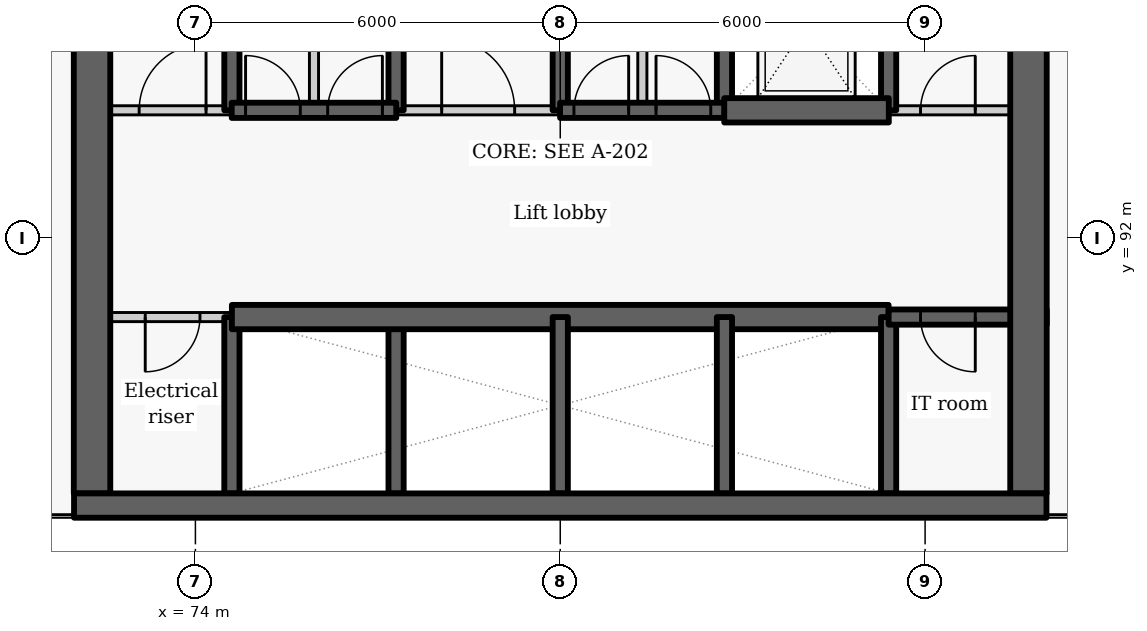
"""IFC4 building model, lengths in metres.
Left out: names, types, materials, properties, quantities, classifications, styles, units other than length and angle.
Written with IfcOpenShell. Run it as: python <this file> out.ifc"""

import sys

from ifc_helpers import new_model, si_unit, direction, frame, frame_2d, origin, place, context, subcontext, project, spatial, rectangle, extrude, element, fill, save


model = new_model("IFC4")
c1 = context("Model", 3, precision=1e-05, world=origin(), true_north=direction((0.0, 1.0)))
c2 = subcontext(c1, "Body", "Model", "MODEL_VIEW")
j1 = project(units=[si_unit("LENGTHUNIT", "METRE"), si_unit("PLANEANGLEUNIT", "RADIAN")], contexts=[c1])
p1 = place(None, origin())
s1 = spatial("IfcSite", under=j1, at=p1, CompositionType="ELEMENT")
p2 = place(p1, origin())
s2 = spatial("IfcBuilding", under=s1, at=p2, CompositionType="ELEMENT")
p3 = place(p2, frame((0.0, 0.0, 6.6)))
s3 = spatial("IfcBuildingStorey", under=s2, at=p3, CompositionType="ELEMENT", Elevation=6.6)
p4 = place(p3, frame((74.6, 87.8, -0.3), z_axis=(0.0, 0.0, 1.0), x_axis=(0.0, 1.0, 0.0)))
e1 = element("IfcWall", 1, at=p4, inside=s3, PredefinedType="SHEAR", context=c2, shape_type="SweptSolid", body=[
    extrude(rectangle(XDim=2.9, YDim=0.25, at=frame_2d((1.45, 0.0))), origin(), (0.0, 0.0, 1.0), 4.8),
])
p5 = place(p3, frame((74.6, 94.1, -0.3), z_axis=(0.0, 0.0, 1.0), x_axis=(0.0, 1.0, 0.0)))
e2 = element("IfcWall", 2, at=p5, inside=s3, PredefinedType="SHEAR", context=c2, shape_type="SweptSolid", body=[
    extrude(rectangle(XDim=2.8, YDim=0.25, at=frame_2d((1.4, 0.0))), origin(), (0.0, 0.0, 1.0), 4.8),
])
p6 = place(p3, frame((74.6, 90.7, 0.0), z_axis=(0.0, 0.0, 1.0), x_axis=(-1.0, 0.0, 0.0)))
e3 = element("IfcWall", 3, at=p6, inside=s3, PredefinedType="PARTITIONING", context=c2, shape_type="SweptSolid", body=[
    extrude(rectangle(XDim=2.6, YDim=0.15, at=frame_2d((1.3, 0.0))), origin(), (0.0, 0.0, 1.0), 4.5),
])
p7 = place(p6, frame((0.525, 0.0, 0.0)))
e4 = element("IfcOpeningElement", 4, at=p7, cuts=e3, PredefinedType="OPENING", context=c2, shape_type="SweptSolid", body=[
    extrude(rectangle(XDim=0.9, YDim=2.1, at=frame_2d((0.45, 1.05))), frame((0.0, 0.085, 0.0), z_axis=(0.0, -1.0, 0.0), x_axis=(1.0, 0.0, 0.0)), (0.0, 0.0, 1.0), 0.17),
])
p8 = place(p3, frame((72.3, 87.8, -0.3), z_axis=(0.0, 0.0, 1.0), x_axis=(0.0, 1.0, 0.0)))
e5 = element("IfcWall", 5, at=p8, inside=s3, PredefinedType="SHEAR", context=c2, shape_type="SweptSolid", body=[
    extrude(rectangle(XDim=9.1, YDim=0.6, at=frame_2d((4.55, 0.0))), origin(), (0.0, 0.0, 1.0), 4.8),
])
p9 = place(p3, frame((77.3, 87.8, -0.3), z_axis=(0.0, 0.0, 1.0), x_axis=(0.0, 1.0, 0.0)))
e6 = element("IfcWall", 6, at=p9, inside=s3, PredefinedType="SHEAR", context=c2, shape_type="SweptSolid", body=[
    extrude(rectangle(XDim=2.9, YDim=0.25, at=frame_2d((1.45, 0.0))), origin(), (0.0, 0.0, 1.0), 4.8),
])
p10 = place(p3, frame((77.3, 94.1, -0.3), z_axis=(0.0, 0.0, 1.0), x_axis=(0.0, 1.0, 0.0)))
e7 = element("IfcWall", 7, at=p10, inside=s3, PredefinedType="SHEAR", context=c2, shape_type="SweptSolid", body=[
    extrude(rectangle(XDim=2.8, YDim=0.25, at=frame_2d((1.4, 0.0))), origin(), (0.0, 0.0, 1.0), 4.8),
])
p11 = place(p3, frame((74.6, 90.7, -0.3), z_axis=(0.0, 0.0, 1.0), x_axis=(1.0, 0.0, 0.0)))
e8 = element("IfcWall", 8, at=p11, inside=s3, PredefinedType="SHEAR", context=c2, shape_type="SweptSolid", body=[
    extrude(rectangle(XDim=10.8, YDim=0.4, at=frame_2d((5.4, 0.0))), origin(), (0.0, 0.0, 1.0), 4.8),
])
p12 = place(p3, frame((80.0, 87.8, -0.3), z_axis=(0.0, 0.0, 1.0), x_axis=(0.0, 1.0, 0.0)))
e9 = element("IfcWall", 9, at=p12, inside=s3, PredefinedType="SHEAR", context=c2, shape_type="SweptSolid", body=[
    extrude(rectangle(XDim=2.9, YDim=0.25, at=frame_2d((1.45, 0.0))), origin(), (0.0, 0.0, 1.0), 4.8),
])
p13 = place(p3, frame((80.0, 94.1, -0.3), z_axis=(0.0, 0.0, 1.0), x_axis=(0.0, 1.0, 0.0)))
e10 = element("IfcWall", 10, at=p13, inside=s3, PredefinedType="SHEAR", context=c2, shape_type="SweptSolid", body=[
    extrude(rectangle(XDim=2.8, YDim=0.25, at=frame_2d((1.4, 0.0))), origin(), (0.0, 0.0, 1.0), 4.8),
])
p14 = place(p3, frame((82.7, 87.8, -0.3), z_axis=(0.0, 0.0, 1.0), x_axis=(0.0, 1.0, 0.0)))
e11 = element("IfcWall", 11, at=p14, inside=s3, PredefinedType="SHEAR", context=c2, shape_type="SweptSolid", body=[
    extrude(rectangle(XDim=2.9, YDim=0.25, at=frame_2d((1.45, 0.0))), origin(), (0.0, 0.0, 1.0), 4.8),
])
p15 = place(p3, frame((82.7, 94.1, -0.3), z_axis=(0.0, 0.0, 1.0), x_axis=(0.0, 1.0, 0.0)))
e12 = element("IfcWall", 12, at=p15, inside=s3, PredefinedType="SHEAR", context=c2, shape_type="SweptSolid", body=[
    extrude(rectangle(XDim=2.8, YDim=0.25, at=frame_2d((1.4, 0.0))), origin(), (0.0, 0.0, 1.0), 4.8),
])
p16 = place(p3, frame((85.4, 87.8, -0.3), z_axis=(0.0, 0.0, 1.0), x_axis=(0.0, 1.0, 0.0)))
e13 = element("IfcWall", 13, at=p16, inside=s3, PredefinedType="SHEAR", context=c2, shape_type="SweptSolid", body=[
    extrude(rectangle(XDim=2.9, YDim=0.25, at=frame_2d((1.45, 0.0))), origin(), (0.0, 0.0, 1.0), 4.8),
])
p17 = place(p3, frame((85.4, 94.1, -0.3), z_axis=(0.0, 0.0, 1.0), x_axis=(0.0, 1.0, 0.0)))
e14 = element("IfcWall", 14, at=p17, inside=s3, PredefinedType="SHEAR", context=c2, shape_type="SweptSolid", body=[
    extrude(rectangle(XDim=2.8, YDim=0.25, at=frame_2d((1.4, 0.0))), origin(), (0.0, 0.0, 1.0), 4.8),
])
p18 = place(p3, frame((88.0, 90.7, -0.3), z_axis=(0.0, 0.0, 1.0), x_axis=(-1.0, 0.0, 0.0)))
e15 = element("IfcWall", 15, at=p18, inside=s3, PredefinedType="SHEAR", context=c2, shape_type="SweptSolid", body=[
    extrude(rectangle(XDim=2.6, YDim=0.25, at=frame_2d((1.3, 0.0))), origin(), (0.0, 0.0, 1.0), 4.8),
])
p19 = place(p18, frame((1.175, 0.0, 0.3)))
e16 = element("IfcOpeningElement", 16, at=p19, cuts=e15, PredefinedType="OPENING", context=c2, shape_type="SweptSolid", body=[
    extrude(rectangle(XDim=0.9, YDim=2.1, at=frame_2d((0.45, 1.05))), frame((0.0, 0.135, 0.0), z_axis=(0.0, -1.0, 0.0), x_axis=(1.0, 0.0, 0.0)), (0.0, 0.0, 1.0), 0.27),
])
p20 = place(p3, frame((87.7, 103.4, -0.3), z_axis=(0.0, 0.0, 1.0), x_axis=(0.0, -1.0, 0.0)))
e17 = element("IfcWall", 17, at=p20, inside=s3, PredefinedType="SHEAR", context=c2, shape_type="SweptSolid", body=[
    extrude(rectangle(XDim=15.6, YDim=0.6, at=frame_2d((7.8, 0.0))), origin(), (0.0, 0.0, 1.0), 4.8),
])
p21 = place(p20, frame((2.7, 0.0, 0.3)))
e18 = element("IfcOpeningElement", 18, at=p21, cuts=e17, PredefinedType="OPENING", context=c2, shape_type="SweptSolid", body=[
    extrude(rectangle(XDim=1.1, YDim=2.1, at=frame_2d((0.55, 1.05))), frame((0.0, 0.31, 0.0), z_axis=(0.0, -1.0, 0.0), x_axis=(1.0, 0.0, 0.0)), (0.0, 0.0, 1.0), 0.62),
])
p22 = place(p3, frame((72.0, 94.1, 0.0), z_axis=(0.0, 0.0, 1.0), x_axis=(1.0, 0.0, 0.0)))
e19 = element("IfcWall", 19, at=p22, inside=s3, PredefinedType="PARTITIONING", context=c2, shape_type="SweptSolid", body=[
    extrude(rectangle(XDim=2.603, YDim=0.15, at=frame_2d((1.302, 0.0))), origin(), (0.0, 0.0, 1.0), 4.5),
])
p23 = place(p22, frame((1.075, 0.0, 0.0)))
e20 = element("IfcOpeningElement", 20, at=p23, cuts=e19, PredefinedType="OPENING", context=c2, shape_type="SweptSolid", body=[
    extrude(rectangle(XDim=1.1, YDim=2.1, at=frame_2d((0.55, 1.05))), frame((0.0, 0.085, 0.0), z_axis=(0.0, -1.0, 0.0), x_axis=(1.0, 0.0, 0.0)), (0.0, 0.0, 1.0), 0.17),
])
p24 = place(p3, frame((77.297, 94.1, 0.0), z_axis=(0.0, 0.0, 1.0), x_axis=(1.0, 0.0, 0.0)))
e21 = element("IfcWall", 21, at=p24, inside=s3, PredefinedType="PARTITIONING", context=c2, shape_type="SweptSolid", body=[
    extrude(rectangle(XDim=2.706, YDim=0.15, at=frame_2d((1.353, 0.0))), origin(), (0.0, 0.0, 1.0), 4.5),
])
p25 = place(p24, frame((0.753, 0.0, 0.0)))
e22 = element("IfcOpeningElement", 22, at=p25, cuts=e21, PredefinedType="OPENING", context=c2, shape_type="SweptSolid", body=[
    extrude(rectangle(XDim=1.2, YDim=2.1, at=frame_2d((0.6, 1.05))), frame((0.0, 0.085, 0.0), z_axis=(0.0, -1.0, 0.0), x_axis=(1.0, 0.0, 0.0)), (0.0, 0.0, 1.0), 0.17),
])
p26 = place(p3, frame((85.397, 94.1, 0.0), z_axis=(0.0, 0.0, 1.0), x_axis=(1.0, 0.0, 0.0)))
e23 = element("IfcWall", 23, at=p26, inside=s3, PredefinedType="PARTITIONING", context=c2, shape_type="SweptSolid", body=[
    extrude(rectangle(XDim=2.603, YDim=0.15, at=frame_2d((1.302, 0.0))), origin(), (0.0, 0.0, 1.0), 4.5),
])
p27 = place(p26, frame((0.528, 0.0, 0.0)))
e24 = element("IfcOpeningElement", 24, at=p27, cuts=e23, PredefinedType="OPENING", context=c2, shape_type="SweptSolid", body=[
    extrude(rectangle(XDim=0.9, YDim=2.1, at=frame_2d((0.45, 1.05))), frame((0.0, 0.085, 0.0), z_axis=(0.0, -1.0, 0.0), x_axis=(1.0, 0.0, 0.0)), (0.0, 0.0, 1.0), 0.17),
])
p28 = place(p3, frame((74.597, 94.1, -0.3), z_axis=(0.0, 0.0, 1.0), x_axis=(1.0, 0.0, 0.0)))
e25 = element("IfcWall", 25, at=p28, inside=s3, PredefinedType="SHEAR", context=c2, shape_type="SweptSolid", body=[
    extrude(rectangle(XDim=2.706, YDim=0.25, at=frame_2d((1.353, 0.0))), origin(), (0.0, 0.0, 1.0), 4.8),
])
p29 = place(p28, frame((0.228, 0.0, 0.3)))
e26 = element("IfcOpeningElement", 26, at=p29, cuts=e25, PredefinedType="OPENING", context=c2, shape_type="SweptSolid", body=[
    extrude(rectangle(XDim=0.9, YDim=2.1, at=frame_2d((0.45, 1.05))), frame((0.0, 0.135, 0.0), z_axis=(0.0, -1.0, 0.0), x_axis=(1.0, 0.0, 0.0)), (0.0, 0.0, 1.0), 0.27),
])
p30 = place(p28, frame((1.578, 0.0, 0.3)))
e27 = element("IfcOpeningElement", 27, at=p30, cuts=e25, PredefinedType="OPENING", context=c2, shape_type="SweptSolid", body=[
    extrude(rectangle(XDim=0.9, YDim=2.1, at=frame_2d((0.45, 1.05))), frame((0.0, 0.135, 0.0), z_axis=(0.0, -1.0, 0.0), x_axis=(1.0, 0.0, 0.0)), (0.0, 0.0, 1.0), 0.27),
])
p31 = place(p3, frame((79.997, 94.1, -0.3), z_axis=(0.0, 0.0, 1.0), x_axis=(1.0, 0.0, 0.0)))
e28 = element("IfcWall", 28, at=p31, inside=s3, PredefinedType="SHEAR", context=c2, shape_type="SweptSolid", body=[
    extrude(rectangle(XDim=2.706, YDim=0.25, at=frame_2d((1.353, 0.0))), origin(), (0.0, 0.0, 1.0), 4.8),
])
p32 = place(p31, frame((0.228, 0.0, 0.3)))
e29 = element("IfcOpeningElement", 29, at=p32, cuts=e28, PredefinedType="OPENING", context=c2, shape_type="SweptSolid", body=[
    extrude(rectangle(XDim=0.9, YDim=2.1, at=frame_2d((0.45, 1.05))), frame((0.0, 0.135, 0.0), z_axis=(0.0, -1.0, 0.0), x_axis=(1.0, 0.0, 0.0)), (0.0, 0.0, 1.0), 0.27),
])
p33 = place(p31, frame((1.578, 0.0, 0.3)))
e30 = element("IfcOpeningElement", 30, at=p33, cuts=e28, PredefinedType="OPENING", context=c2, shape_type="SweptSolid", body=[
    extrude(rectangle(XDim=0.9, YDim=2.1, at=frame_2d((0.45, 1.05))), frame((0.0, 0.135, 0.0), z_axis=(0.0, -1.0, 0.0), x_axis=(1.0, 0.0, 0.0)), (0.0, 0.0, 1.0), 0.27),
])
p34 = place(p3, frame((82.697, 94.1, -0.3), z_axis=(0.0, 0.0, 1.0), x_axis=(1.0, 0.0, 0.0)))
e31 = element("IfcWall", 31, at=p34, inside=s3, PredefinedType="SHEAR", context=c2, shape_type="SweptSolid", body=[
    extrude(rectangle(XDim=2.706, YDim=0.4, at=frame_2d((1.353, 0.0))), origin(), (0.0, 0.0, 1.0), 4.8),
])
for number, where, z_axis, x_axis in (
    (32, (75.95, 94.1, 0.0), (0.0, 0.0, 1.0), (0.0, 1.0, 0.0)),
    (33, (81.35, 94.1, 0.0), (0.0, 0.0, 1.0), (0.0, 1.0, 0.0)),
):
    element("IfcWall", number, at=place(p3, frame(where, z_axis=z_axis, x_axis=x_axis)), inside=s3, PredefinedType="PARTITIONING", context=c2, shape_type="SweptSolid", body=[
        extrude(rectangle(XDim=2.8, YDim=0.15, at=frame_2d((1.4, 0.0))), origin(), (0.0, 0.0, 1.0), 4.5),
    ])
p35 = place(p3, frame((72.004, 87.6, -0.3), z_axis=(0.0, 0.0, 1.0), x_axis=(1.0, 0.0, 0.0)))
e34 = element("IfcWall", 34, at=p35, inside=s3, PredefinedType="SHEAR", context=c2, shape_type="SweptSolid", body=[
    extrude(rectangle(XDim=15.992, YDim=0.4, at=frame_2d((7.996, 0.0))), origin(), (0.0, 0.0, 1.0), 4.8),
])
p36 = place(p7, origin())
e35 = element("IfcDoor", 35, at=p36, inside=s3, OperationType="SINGLE_SWING_RIGHT", PredefinedType="DOOR", context=c2, shape_type="SweptSolid", body=[
    extrude(rectangle(XDim=0.9, YDim=2.1, at=frame_2d((0.45, 1.05))), frame((0.0, 0.025, 0.0), z_axis=(0.0, -1.0, 0.0), x_axis=(1.0, 0.0, 0.0)), (0.0, 0.0, 1.0), 0.05),
])
fill(e4, e35)
p37 = place(p19, origin())
e36 = element("IfcDoor", 36, at=p37, inside=s3, OperationType="SINGLE_SWING_LEFT", PredefinedType="DOOR", context=c2, shape_type="SweptSolid", body=[
    extrude(rectangle(XDim=0.9, YDim=2.1, at=frame_2d((0.45, 1.05))), frame((0.0, 0.025, 0.0), z_axis=(0.0, -1.0, 0.0), x_axis=(1.0, 0.0, 0.0)), (0.0, 0.0, 1.0), 0.05),
])
fill(e16, e36)
p38 = place(p23, origin())
e37 = element("IfcDoor", 37, at=p38, inside=s3, OperationType="SINGLE_SWING_RIGHT", PredefinedType="DOOR", context=c2, shape_type="SweptSolid", body=[
    extrude(rectangle(XDim=1.1, YDim=2.1, at=frame_2d((0.55, 1.05))), frame((0.0, 0.025, 0.0), z_axis=(0.0, -1.0, 0.0), x_axis=(1.0, 0.0, 0.0)), (0.0, 0.0, 1.0), 0.05),
])
fill(e20, e37)
p39 = place(p29, origin())
e38 = element("IfcDoor", 38, at=p39, inside=s3, OperationType="SINGLE_SWING_LEFT", PredefinedType="DOOR", context=c2, shape_type="SweptSolid", body=[
    extrude(rectangle(XDim=0.9, YDim=2.1, at=frame_2d((0.45, 1.05))), frame((0.0, 0.025, 0.0), z_axis=(0.0, -1.0, 0.0), x_axis=(1.0, 0.0, 0.0)), (0.0, 0.0, 1.0), 0.05),
])
fill(e26, e38)
p40 = place(p30, origin())
e39 = element("IfcDoor", 39, at=p40, inside=s3, OperationType="SINGLE_SWING_RIGHT", PredefinedType="DOOR", context=c2, shape_type="SweptSolid", body=[
    extrude(rectangle(XDim=0.9, YDim=2.1, at=frame_2d((0.45, 1.05))), frame((0.0, 0.025, 0.0), z_axis=(0.0, -1.0, 0.0), x_axis=(1.0, 0.0, 0.0)), (0.0, 0.0, 1.0), 0.05),
])
fill(e27, e39)
p41 = place(p25, origin())
e40 = element("IfcDoor", 40, at=p41, inside=s3, OperationType="DOUBLE_DOOR_SINGLE_SWING", PredefinedType="DOOR", context=c2, shape_type="SweptSolid", body=[
    extrude(rectangle(XDim=1.2, YDim=2.1, at=frame_2d((0.6, 1.05))), frame((0.0, 0.025, 0.0), z_axis=(0.0, -1.0, 0.0), x_axis=(1.0, 0.0, 0.0)), (0.0, 0.0, 1.0), 0.05),
])
fill(e22, e40)
p42 = place(p32, origin())
e41 = element("IfcDoor", 41, at=p42, inside=s3, OperationType="SINGLE_SWING_RIGHT", PredefinedType="DOOR", context=c2, shape_type="SweptSolid", body=[
    extrude(rectangle(XDim=0.9, YDim=2.1, at=frame_2d((0.45, 1.05))), frame((0.0, 0.025, 0.0), z_axis=(0.0, -1.0, 0.0), x_axis=(1.0, 0.0, 0.0)), (0.0, 0.0, 1.0), 0.05),
])
fill(e29, e41)
p43 = place(p33, origin())
e42 = element("IfcDoor", 42, at=p43, inside=s3, OperationType="SINGLE_SWING_LEFT", PredefinedType="DOOR", context=c2, shape_type="SweptSolid", body=[
    extrude(rectangle(XDim=0.9, YDim=2.1, at=frame_2d((0.45, 1.05))), frame((0.0, 0.025, 0.0), z_axis=(0.0, -1.0, 0.0), x_axis=(1.0, 0.0, 0.0)), (0.0, 0.0, 1.0), 0.05),
])
fill(e30, e42)
p44 = place(p27, origin())
e43 = element("IfcDoor", 43, at=p44, inside=s3, OperationType="SINGLE_SWING_RIGHT", PredefinedType="DOOR", context=c2, shape_type="SweptSolid", body=[
    extrude(rectangle(XDim=0.9, YDim=2.1, at=frame_2d((0.45, 1.05))), frame((0.0, 0.025, 0.0), z_axis=(0.0, -1.0, 0.0), x_axis=(1.0, 0.0, 0.0)), (0.0, 0.0, 1.0), 0.05),
])
fill(e24, e43)
save(model, sys.argv[1])
